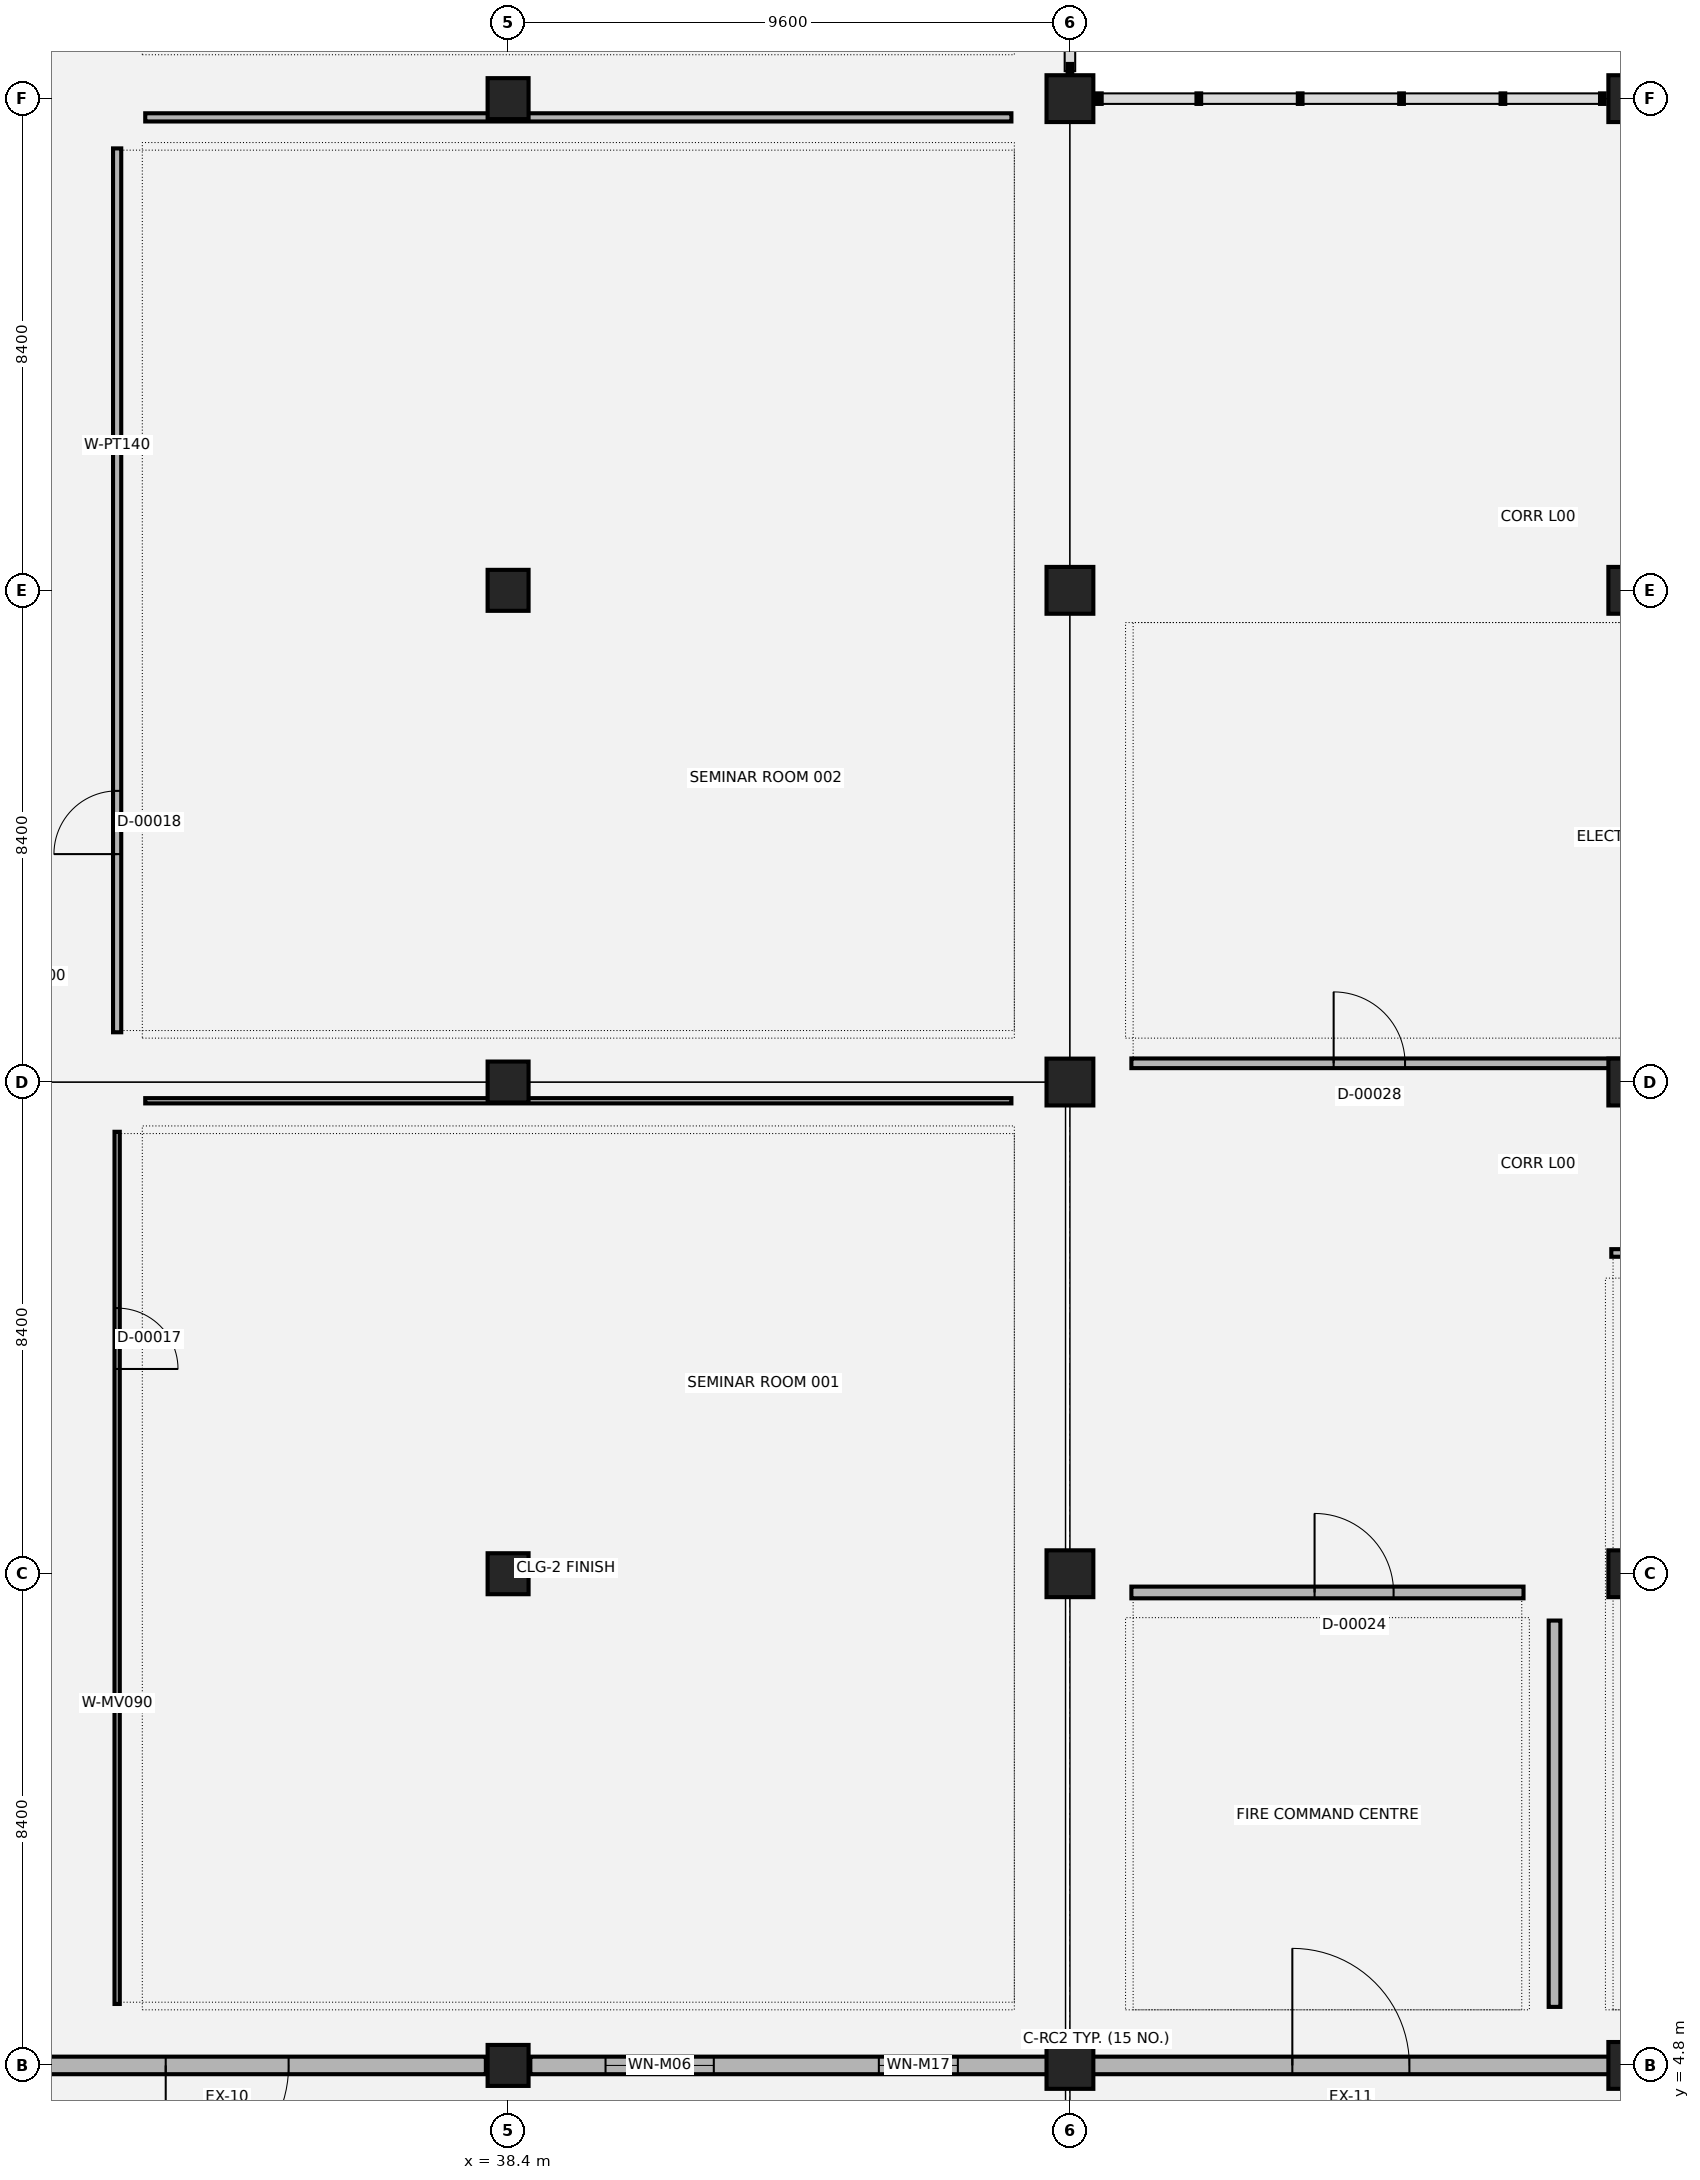
"""IFC4 building model, lengths in metres.
Left out: names, types, materials, properties, quantities, classifications, styles, units other than length and angle.
Written with IfcOpenShell. Run it as: python <this file> out.ifc"""

import sys

from ifc_helpers import new_model, si_unit, direction, frame, frame_2d, origin, origin_2d, place, context, subcontext, project, spatial, rectangle, extrude, element, fill, save


model = new_model("IFC4")
c1 = context("Model", 3, precision=1e-05, world=origin(), true_north=direction((0.0, 1.0)))
c2 = subcontext(c1, "Body", "Model", "MODEL_VIEW")
j1 = project(units=[si_unit("LENGTHUNIT", "METRE"), si_unit("PLANEANGLEUNIT", "RADIAN")], contexts=[c1])
p1 = place(None, origin())
s1 = spatial("IfcSite", under=j1, at=p1, CompositionType="ELEMENT")
p2 = place(p1, origin())
s2 = spatial("IfcBuilding", under=s1, at=p2, CompositionType="ELEMENT")
p3 = place(p2, origin())
s3 = spatial("IfcBuildingStorey", under=s2, at=p3, CompositionType="ELEMENT", Elevation=0.0)
for number, where, z_axis, x_axis in (
    (1, (38.4, 4.8, 0.0), (0.0, 0.0, 1.0), (1.0, 0.0, 0.0)),
    (2, (38.4, 13.2, 0.0), (0.0, 0.0, 1.0), (1.0, 0.0, 0.0)),
    (3, (38.4, 21.6, 0.0), (0.0, 0.0, 1.0), (1.0, 0.0, 0.0)),
    (4, (38.4, 30.0, 0.0), (0.0, 0.0, 1.0), (1.0, 0.0, 0.0)),
    (5, (38.4, 38.4, 0.0), (0.0, 0.0, 1.0), (1.0, 0.0, 0.0)),
):
    element("IfcColumn", number, at=place(p3, frame(where, z_axis=z_axis, x_axis=x_axis)), inside=s3, PredefinedType="COLUMN", context=c2, shape_type="SweptSolid", body=[
        extrude(rectangle(XDim=0.7, YDim=0.7, at=origin_2d()), origin(), (0.0, 0.0, 1.0), 5.4),
    ])
for number, where, z_axis, x_axis in (
    (6, (48.0, 4.8, 0.0), (0.0, 0.0, 1.0), (1.0, 0.0, 0.0)),
    (7, (48.0, 13.2, 0.0), (0.0, 0.0, 1.0), (1.0, 0.0, 0.0)),
    (8, (48.0, 21.6, 0.0), (0.0, 0.0, 1.0), (1.0, 0.0, 0.0)),
    (9, (48.0, 30.0, 0.0), (0.0, 0.0, 1.0), (1.0, 0.0, 0.0)),
    (10, (48.0, 38.4, 0.0), (0.0, 0.0, 1.0), (1.0, 0.0, 0.0)),
    (11, (57.6, 4.8, 0.0), (0.0, 0.0, 1.0), (1.0, 0.0, 0.0)),
    (12, (57.6, 13.2, 0.0), (0.0, 0.0, 1.0), (1.0, 0.0, 0.0)),
    (13, (57.6, 21.6, 0.0), (0.0, 0.0, 1.0), (1.0, 0.0, 0.0)),
    (14, (57.6, 30.0, 0.0), (0.0, 0.0, 1.0), (1.0, 0.0, 0.0)),
    (15, (57.6, 38.4, 0.0), (0.0, 0.0, 1.0), (1.0, 0.0, 0.0)),
):
    element("IfcColumn", number, at=place(p3, frame(where, z_axis=z_axis, x_axis=x_axis)), inside=s3, PredefinedType="COLUMN", context=c2, shape_type="SweptSolid", body=[
        extrude(rectangle(XDim=0.8, YDim=0.8, at=origin_2d()), origin(), (0.0, 0.0, 1.0), 5.4),
    ])
p4 = place(p3, frame((29.18, 4.8, 0.0), z_axis=(0.0, 0.0, 1.0), x_axis=(1.0, 0.0, 0.0)))
e16 = element("IfcWall", 16, at=p4, inside=s3, PredefinedType="SOLIDWALL", context=c2, shape_type="SweptSolid", body=[
    extrude(rectangle(XDim=8.84, YDim=0.3, at=frame_2d((4.42, 0.0))), origin(), (0.0, 0.0, 1.0), 4.04),
])
p5 = place(p4, frame((3.37, 0.0, 0.0)))
e17 = element("IfcOpeningElement", 17, at=p5, cuts=e16, PredefinedType="OPENING", context=c2, shape_type="SweptSolid", body=[
    extrude(rectangle(XDim=2.1, YDim=2.2, at=frame_2d((1.05, 1.1))), frame((0.0, 0.16, 0.0), z_axis=(0.0, -1.0, 0.0), x_axis=(1.0, 0.0, 0.0)), (0.0, 0.0, 1.0), 0.32),
])
p6 = place(p3, frame((38.78, 4.8, 0.0), z_axis=(0.0, 0.0, 1.0), x_axis=(1.0, 0.0, 0.0)))
e18 = element("IfcWall", 18, at=p6, inside=s3, PredefinedType="SOLIDWALL", context=c2, shape_type="SweptSolid", body=[
    extrude(rectangle(XDim=8.84, YDim=0.3, at=frame_2d((4.42, 0.0))), origin(), (0.0, 0.0, 1.0), 4.04),
])
p7 = place(p6, frame((1.285, 0.0, 0.9)))
e19 = element("IfcOpeningElement", 19, at=p7, cuts=e18, PredefinedType="OPENING", context=c2, shape_type="SweptSolid", body=[
    extrude(rectangle(XDim=1.85, YDim=1.55, at=frame_2d((0.925, 0.775))), frame((0.0, 0.16, 0.0), z_axis=(0.0, -1.0, 0.0), x_axis=(1.0, 0.0, 0.0)), (0.0, 0.0, 1.0), 0.32),
])
p8 = place(p6, frame((5.955, 0.0, 0.9)))
e20 = element("IfcOpeningElement", 20, at=p8, cuts=e18, PredefinedType="OPENING", context=c2, shape_type="SweptSolid", body=[
    extrude(rectangle(XDim=1.35, YDim=1.35, at=frame_2d((0.675, 0.675))), frame((0.0, 0.16, 0.0), z_axis=(0.0, -1.0, 0.0), x_axis=(1.0, 0.0, 0.0)), (0.0, 0.0, 1.0), 0.32),
])
p9 = place(p3, frame((48.38, 4.8, 0.0), z_axis=(0.0, 0.0, 1.0), x_axis=(1.0, 0.0, 0.0)))
e21 = element("IfcWall", 21, at=p9, inside=s3, PredefinedType="SOLIDWALL", context=c2, shape_type="SweptSolid", body=[
    extrude(rectangle(XDim=8.84, YDim=0.3, at=frame_2d((4.42, 0.0))), origin(), (0.0, 0.0, 1.0), 4.04),
])
p10 = place(p9, frame((3.42, 0.0, 0.0)))
e22 = element("IfcOpeningElement", 22, at=p10, cuts=e21, PredefinedType="OPENING", context=c2, shape_type="SweptSolid", body=[
    extrude(rectangle(XDim=2.0, YDim=2.2, at=frame_2d((1.0, 1.1))), frame((0.0, 0.16, 0.0), z_axis=(0.0, -1.0, 0.0), x_axis=(1.0, 0.0, 0.0)), (0.0, 0.0, 1.0), 0.32),
])
p11 = place(p3, frame((31.72, 5.85, 0.0), z_axis=(0.0, 0.0, 1.0), x_axis=(0.0, 1.0, 0.0)))
e23 = element("IfcWall", 23, at=p11, inside=s3, PredefinedType="MOVABLE", context=c2, shape_type="SweptSolid", body=[
    extrude(rectangle(XDim=14.9, YDim=0.09, at=frame_2d((7.45, 0.0))), origin(), (0.0, 0.0, 1.0), 4.04),
])
p12 = place(p11, frame((10.848, 0.0, 0.0)))
e24 = element("IfcOpeningElement", 24, at=p12, cuts=e23, PredefinedType="OPENING", context=c2, shape_type="SweptSolid", body=[
    extrude(rectangle(XDim=1.04, YDim=2.15, at=frame_2d((0.52, 1.075))), frame((0.0, 0.055, 0.0), z_axis=(0.0, -1.0, 0.0), x_axis=(1.0, 0.0, 0.0)), (0.0, 0.0, 1.0), 0.11),
])
p13 = place(p3, frame((32.2, 21.28, 0.0), z_axis=(0.0, 0.0, 1.0), x_axis=(1.0, 0.0, 0.0)))
e25 = element("IfcWall", 25, at=p13, inside=s3, PredefinedType="MOVABLE", context=c2, shape_type="SweptSolid", body=[
    extrude(rectangle(XDim=14.8, YDim=0.09, at=frame_2d((7.4, 0.0))), origin(), (0.0, 0.0, 1.0), 4.04),
])
p14 = place(p3, frame((31.72, 22.45, 0.0), z_axis=(0.0, 0.0, 1.0), x_axis=(0.0, 1.0, 0.0)))
e26 = element("IfcWall", 26, at=p14, inside=s3, PredefinedType="PARTITIONING", context=c2, shape_type="SweptSolid", body=[
    extrude(rectangle(XDim=15.1, YDim=0.14, at=frame_2d((7.55, 0.0))), origin(), (0.0, 0.0, 1.0), 4.04),
])
p15 = place(p14, frame((3.044, 0.0, 0.0)))
e27 = element("IfcOpeningElement", 27, at=p15, cuts=e26, PredefinedType="OPENING", context=c2, shape_type="SweptSolid", body=[
    extrude(rectangle(XDim=1.08, YDim=2.15, at=frame_2d((0.54, 1.075))), frame((0.0, 0.08, 0.0), z_axis=(0.0, -1.0, 0.0), x_axis=(1.0, 0.0, 0.0)), (0.0, 0.0, 1.0), 0.16),
])
p16 = place(p3, frame((32.2, 38.08, 0.0), z_axis=(0.0, 0.0, 1.0), x_axis=(1.0, 0.0, 0.0)))
e28 = element("IfcWall", 28, at=p16, inside=s3, PredefinedType="PARTITIONING", context=c2, shape_type="SweptSolid", body=[
    extrude(rectangle(XDim=14.8, YDim=0.14, at=frame_2d((7.4, 0.0))), origin(), (0.0, 0.0, 1.0), 4.04),
])
p17 = place(p3, frame((49.05, 12.88, 0.0), z_axis=(0.0, 0.0, 1.0), x_axis=(1.0, 0.0, 0.0)))
e29 = element("IfcWall", 29, at=p17, inside=s3, PredefinedType="PARTITIONING", context=c2, shape_type="SweptSolid", body=[
    extrude(rectangle(XDim=6.7, YDim=0.2, at=frame_2d((3.35, 0.0))), origin(), (0.0, 0.0, 1.0), 4.04),
])
p18 = place(p17, frame((3.13, 0.0, 0.0)))
e30 = element("IfcOpeningElement", 30, at=p18, cuts=e29, PredefinedType="OPENING", context=c2, shape_type="SweptSolid", body=[
    extrude(rectangle(XDim=1.35, YDim=2.15, at=frame_2d((0.675, 1.075))), frame((0.0, 0.11, 0.0), z_axis=(0.0, -1.0, 0.0), x_axis=(1.0, 0.0, 0.0)), (0.0, 0.0, 1.0), 0.22),
])
p19 = place(p3, frame((56.28, 5.8, 0.0), z_axis=(0.0, 0.0, 1.0), x_axis=(0.0, 1.0, 0.0)))
e31 = element("IfcWall", 31, at=p19, inside=s3, PredefinedType="PARTITIONING", context=c2, shape_type="SweptSolid", body=[
    extrude(rectangle(XDim=6.6, YDim=0.2, at=frame_2d((3.3, 0.0))), origin(), (0.0, 0.0, 1.0), 4.04),
])
p20 = place(p3, frame((57.25, 18.68, 0.0), z_axis=(0.0, 0.0, 1.0), x_axis=(1.0, 0.0, 0.0)))
e32 = element("IfcWall", 32, at=p20, inside=s3, PredefinedType="PARTITIONING", context=c2, shape_type="SweptSolid", body=[
    extrude(rectangle(XDim=18.7, YDim=0.13, at=frame_2d((9.35, 0.0))), origin(), (0.0, 0.0, 1.0), 4.04),
])
p21 = place(p20, frame((13.936, 0.0, 0.0)))
e33 = element("IfcOpeningElement", 33, at=p21, cuts=e32, PredefinedType="OPENING", context=c2, shape_type="SweptSolid", body=[
    extrude(rectangle(XDim=0.98, YDim=2.1, at=frame_2d((0.49, 1.05))), frame((0.0, 0.075, 0.0), z_axis=(0.0, -1.0, 0.0), x_axis=(1.0, 0.0, 0.0)), (0.0, 0.0, 1.0), 0.15),
])
p22 = place(p3, frame((49.05, 21.92, 0.0), z_axis=(0.0, 0.0, 1.0), x_axis=(1.0, 0.0, 0.0)))
e34 = element("IfcWall", 34, at=p22, inside=s3, PredefinedType="PARTITIONING", context=c2, shape_type="SweptSolid", body=[
    extrude(rectangle(XDim=17.3, YDim=0.165, at=frame_2d((8.65, 0.0))), origin(), (0.0, 0.0, 1.0), 4.04),
])
p23 = place(p22, frame((3.456, 0.0, 0.0)))
e35 = element("IfcOpeningElement", 35, at=p23, cuts=e34, PredefinedType="OPENING", context=c2, shape_type="SweptSolid", body=[
    extrude(rectangle(XDim=1.22, YDim=2.15, at=frame_2d((0.61, 1.075))), frame((0.0, 0.093, 0.0), z_axis=(0.0, -1.0, 0.0), x_axis=(1.0, 0.0, 0.0)), (0.0, 0.0, 1.0), 0.185),
])
p24 = place(p5, origin())
e36 = element("IfcDoor", 36, at=p24, inside=s3, OperationType="SINGLE_SWING_RIGHT", PredefinedType="DOOR", context=c2, shape_type="SweptSolid", body=[
    extrude(rectangle(XDim=2.1, YDim=2.2, at=frame_2d((1.05, 1.1))), frame((0.0, 0.025, 0.0), z_axis=(0.0, -1.0, 0.0), x_axis=(1.0, 0.0, 0.0)), (0.0, 0.0, 1.0), 0.05),
])
fill(e17, e36)
p25 = place(p7, origin())
e37 = element("IfcWindow", 37, at=p25, inside=s3, PartitioningType="SINGLE_PANEL", PredefinedType="WINDOW", context=c2, shape_type="SweptSolid", body=[
    extrude(rectangle(XDim=1.85, YDim=1.55, at=frame_2d((0.925, 0.775))), frame((0.0, 0.03, 0.0), z_axis=(0.0, -1.0, 0.0), x_axis=(1.0, 0.0, 0.0)), (0.0, 0.0, 1.0), 0.06),
])
fill(e19, e37)
p26 = place(p8, origin())
e38 = element("IfcWindow", 38, at=p26, inside=s3, PartitioningType="SINGLE_PANEL", PredefinedType="WINDOW", context=c2, shape_type="SweptSolid", body=[
    extrude(rectangle(XDim=1.35, YDim=1.35, at=frame_2d((0.675, 0.675))), frame((0.0, 0.03, 0.0), z_axis=(0.0, -1.0, 0.0), x_axis=(1.0, 0.0, 0.0)), (0.0, 0.0, 1.0), 0.06),
])
fill(e20, e38)
p27 = place(p10, origin())
e39 = element("IfcDoor", 39, at=p27, inside=s3, OperationType="SINGLE_SWING_LEFT", PredefinedType="DOOR", context=c2, shape_type="SweptSolid", body=[
    extrude(rectangle(XDim=2.0, YDim=2.2, at=frame_2d((1.0, 1.1))), frame((0.0, 0.025, 0.0), z_axis=(0.0, -1.0, 0.0), x_axis=(1.0, 0.0, 0.0)), (0.0, 0.0, 1.0), 0.05),
])
fill(e22, e39)
p28 = place(p12, origin())
e40 = element("IfcDoor", 40, at=p28, inside=s3, OperationType="SINGLE_SWING_RIGHT", PredefinedType="DOOR", context=c2, shape_type="SweptSolid", body=[
    extrude(rectangle(XDim=1.04, YDim=2.15, at=frame_2d((0.52, 1.075))), frame((0.0, 0.025, 0.0), z_axis=(0.0, -1.0, 0.0), x_axis=(1.0, 0.0, 0.0)), (0.0, 0.0, 1.0), 0.05),
])
fill(e24, e40)
p29 = place(p15, origin())
e41 = element("IfcDoor", 41, at=p29, inside=s3, OperationType="SINGLE_SWING_LEFT", PredefinedType="DOOR", context=c2, shape_type="SweptSolid", body=[
    extrude(rectangle(XDim=1.08, YDim=2.15, at=frame_2d((0.54, 1.075))), frame((0.0, 0.025, 0.0), z_axis=(0.0, -1.0, 0.0), x_axis=(1.0, 0.0, 0.0)), (0.0, 0.0, 1.0), 0.05),
])
fill(e27, e41)
p30 = place(p18, origin())
e42 = element("IfcDoor", 42, at=p30, inside=s3, OperationType="SINGLE_SWING_LEFT", PredefinedType="DOOR", context=c2, shape_type="SweptSolid", body=[
    extrude(rectangle(XDim=1.35, YDim=2.15, at=frame_2d((0.675, 1.075))), frame((0.0, 0.025, 0.0), z_axis=(0.0, -1.0, 0.0), x_axis=(1.0, 0.0, 0.0)), (0.0, 0.0, 1.0), 0.05),
])
fill(e30, e42)
p31 = place(p23, origin())
e43 = element("IfcDoor", 43, at=p31, inside=s3, OperationType="SINGLE_SWING_LEFT", PredefinedType="DOOR", context=c2, shape_type="SweptSolid", body=[
    extrude(rectangle(XDim=1.22, YDim=2.15, at=frame_2d((0.61, 1.075))), frame((0.0, 0.025, 0.0), z_axis=(0.0, -1.0, 0.0), x_axis=(1.0, 0.0, 0.0)), (0.0, 0.0, 1.0), 0.05),
])
fill(e35, e43)
save(model, sys.argv[1])
